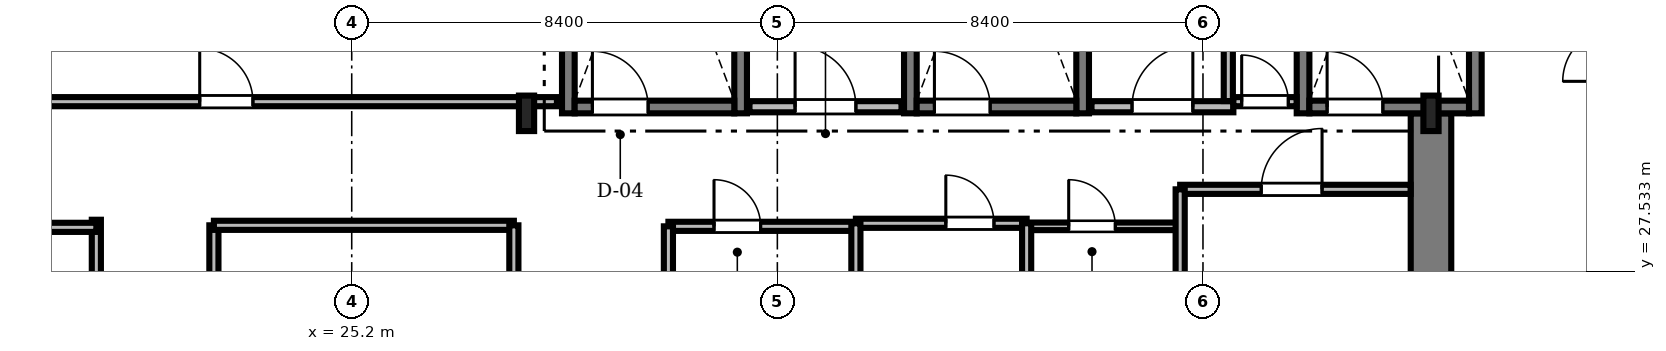
"""IFC4 building model, lengths in metres.
Left out: names, types, materials, properties, quantities, classifications, styles, units other than length and angle.
Written with IfcOpenShell. Run it as: python <this file> out.ifc"""

import sys

from ifc_helpers import new_model, si_unit, direction, frame, frame_2d, origin, origin_2d, place, context, subcontext, project, spatial, rectangle, i_section, extrude, source, transform, mapped, element, fill, save


model = new_model("IFC4")
c1 = context("Model", 3, precision=1e-05, world=origin(), true_north=direction((0.0, 1.0)))
c2 = subcontext(c1, "Body", "Model", "MODEL_VIEW")
j1 = project(units=[si_unit("LENGTHUNIT", "METRE"), si_unit("PLANEANGLEUNIT", "RADIAN")], contexts=[c1])
p1 = place(None, origin())
s1 = spatial("IfcSite", under=j1, at=p1, CompositionType="ELEMENT")
p2 = place(p1, origin())
s2 = spatial("IfcBuilding", under=s1, at=p2, CompositionType="ELEMENT")
p3 = place(p2, frame((0.0, 0.0, 184.8)))
s3 = spatial("IfcBuildingStorey", under=s2, at=p3, CompositionType="ELEMENT", Elevation=184.8)
m1 = source(origin(), c2, "Body", "SweptSolid", [
    extrude(rectangle(XDim=13.15, YDim=0.8, at=frame_2d((6.575, 0.0))), origin(), (0.0, 0.0, 1.0), 3.53),
])
p4 = place(p3, frame((46.5, 17.5, 0.0), z_axis=(0.0, 0.0, 1.0), x_axis=(0.0, 1.0, 0.0)))
e1 = element("IfcWall", 1, at=p4, inside=s3, PredefinedType="SHEAR", context=c2, shape_type="MappedRepresentation", body=[
    mapped(m1, transform((0.0, 0.0, 0.0), scale=1.0)),
])
m2 = source(origin(), c2, "Body", "SweptSolid", [
    extrude(i_section(OverallWidth=0.3, OverallDepth=0.7, WebThickness=0.017, FlangeThickness=0.032, FilletRadius=0.027, at=origin_2d()), origin(), (0.0, 0.0, 1.0), 3.53),
])
for number, where, z_axis, x_axis in (
    (2, (28.65, 30.65, 0.0), (0.0, 0.0, 1.0), (1.0, 0.0, 0.0)),
    (3, (46.5, 30.65, 0.0), (0.0, 0.0, 1.0), (1.0, 0.0, 0.0)),
):
    element("IfcColumn", number, at=place(p3, frame(where, z_axis=z_axis, x_axis=x_axis)), inside=s3, PredefinedType="COLUMN", context=c2, shape_type="MappedRepresentation", body=[
        mapped(m2, transform((0.0, 0.0, 0.0), scale=1.0)),
    ])
m3 = source(origin(), c2, "Body", "SweptSolid", [
    extrude(rectangle(XDim=9.25, YDim=0.25, at=frame_2d((4.625, 0.0))), origin(), (0.0, 0.0, 1.0), 3.55),
])
for number, where, z_axis, x_axis in (
    (4, (29.475, 30.65, 0.0), (0.0, 0.0, 1.0), (0.0, 1.0, 0.0)),
    (5, (32.875, 30.65, 0.0), (0.0, 0.0, 1.0), (0.0, 1.0, 0.0)),
):
    element("IfcWall", number, at=place(p3, frame(where, z_axis=z_axis, x_axis=x_axis)), inside=s3, PredefinedType="SOLIDWALL", context=c2, shape_type="MappedRepresentation", body=[
        mapped(m3, transform((0.0, 0.0, 0.0), scale=1.0)),
    ])
m4 = source(origin(), c2, "Body", "SweptSolid", [
    extrude(rectangle(XDim=3.15, YDim=0.25, at=frame_2d((1.575, 0.0))), origin(), (0.0, 0.0, 1.0), 3.55),
])
p5 = place(p3, frame((29.6, 30.775, 0.0), z_axis=(0.0, 0.0, 1.0), x_axis=(1.0, 0.0, 0.0)))
e6 = element("IfcWall", 6, at=p5, inside=s3, PredefinedType="SOLIDWALL", context=c2, shape_type="MappedRepresentation", body=[
    mapped(m4, transform((0.0, 0.0, 0.0), scale=1.0)),
])
m5 = source(origin(), c2, "Body", "SweptSolid", [
    extrude(rectangle(XDim=1.1, YDim=2.2, at=frame_2d((0.55, 1.1))), frame((0.0, 0.135, 0.0), z_axis=(0.0, -1.0, 0.0), x_axis=(1.0, 0.0, 0.0)), (0.0, 0.0, 1.0), 0.27),
])
p6 = place(p5, frame((0.35, 0.0, 0.0)))
e7 = element("IfcOpeningElement", 7, at=p6, cuts=e6, PredefinedType="OPENING", context=c2, shape_type="MappedRepresentation", body=[
    mapped(m5, transform((0.0, 0.0, 0.0), scale=1.0)),
])
for number, where, z_axis, x_axis in (
    (8, (36.225, 30.65, 0.0), (0.0, 0.0, 1.0), (0.0, 1.0, 0.0)),
    (9, (39.625, 30.65, 0.0), (0.0, 0.0, 1.0), (0.0, 1.0, 0.0)),
):
    element("IfcWall", number, at=place(p3, frame(where, z_axis=z_axis, x_axis=x_axis)), inside=s3, PredefinedType="SOLIDWALL", context=c2, shape_type="MappedRepresentation", body=[
        mapped(m3, transform((0.0, 0.0, 0.0), scale=1.0)),
    ])
p7 = place(p3, frame((36.35, 30.775, 0.0), z_axis=(0.0, 0.0, 1.0), x_axis=(1.0, 0.0, 0.0)))
e10 = element("IfcWall", 10, at=p7, inside=s3, PredefinedType="SOLIDWALL", context=c2, shape_type="MappedRepresentation", body=[
    mapped(m4, transform((0.0, 0.0, 0.0), scale=1.0)),
])
p8 = place(p7, frame((0.35, 0.0, 0.0)))
e11 = element("IfcOpeningElement", 11, at=p8, cuts=e10, PredefinedType="OPENING", context=c2, shape_type="MappedRepresentation", body=[
    mapped(m5, transform((0.0, 0.0, 0.0), scale=1.0)),
])
for number, where, z_axis, x_axis in (
    (12, (43.975, 30.65, 0.0), (0.0, 0.0, 1.0), (0.0, 1.0, 0.0)),
    (13, (47.375, 30.65, 0.0), (0.0, 0.0, 1.0), (0.0, 1.0, 0.0)),
):
    element("IfcWall", number, at=place(p3, frame(where, z_axis=z_axis, x_axis=x_axis)), inside=s3, PredefinedType="SOLIDWALL", context=c2, shape_type="MappedRepresentation", body=[
        mapped(m3, transform((0.0, 0.0, 0.0), scale=1.0)),
    ])
p9 = place(p3, frame((44.1, 30.775, 0.0), z_axis=(0.0, 0.0, 1.0), x_axis=(1.0, 0.0, 0.0)))
e14 = element("IfcWall", 14, at=p9, inside=s3, PredefinedType="SOLIDWALL", context=c2, shape_type="MappedRepresentation", body=[
    mapped(m4, transform((0.0, 0.0, 0.0), scale=1.0)),
])
p10 = place(p9, frame((0.35, 0.0, 0.0)))
e15 = element("IfcOpeningElement", 15, at=p10, cuts=e14, PredefinedType="OPENING", context=c2, shape_type="MappedRepresentation", body=[
    mapped(m5, transform((0.0, 0.0, 0.0), scale=1.0)),
])
m6 = source(origin(), c2, "Body", "SweptSolid", [
    extrude(rectangle(XDim=3.0, YDim=0.22, at=frame_2d((1.5, 0.0))), origin(), (0.0, 0.0, 1.0), 3.53),
])
p11 = place(p3, frame((33.05, 30.78, 0.0), z_axis=(0.0, 0.0, 1.0), x_axis=(1.0, 0.0, 0.0)))
e16 = element("IfcWall", 16, at=p11, inside=s3, PredefinedType="SOLIDWALL", context=c2, shape_type="MappedRepresentation", body=[
    mapped(m6, transform((0.0, 0.0, 0.0), scale=1.0)),
])
m7 = source(origin(), c2, "Body", "SweptSolid", [
    extrude(rectangle(XDim=1.2, YDim=2.2, at=frame_2d((0.6, 1.1))), frame((0.0, 0.12, 0.0), z_axis=(0.0, -1.0, 0.0), x_axis=(1.0, 0.0, 0.0)), (0.0, 0.0, 1.0), 0.24),
])
p12 = place(p11, frame((0.9, 0.0, 0.0)))
e17 = element("IfcOpeningElement", 17, at=p12, cuts=e16, PredefinedType="OPENING", context=c2, shape_type="MappedRepresentation", body=[
    mapped(m7, transform((0.0, 0.0, 0.0), scale=1.0)),
])
m8 = source(origin(), c2, "Body", "SweptSolid", [
    extrude(rectangle(XDim=2.8, YDim=0.22, at=frame_2d((1.4, 0.0))), origin(), (0.0, 0.0, 1.0), 3.53),
])
p13 = place(p3, frame((39.8, 30.78, 0.0), z_axis=(0.0, 0.0, 1.0), x_axis=(1.0, 0.0, 0.0)))
e18 = element("IfcWall", 18, at=p13, inside=s3, PredefinedType="SOLIDWALL", context=c2, shape_type="MappedRepresentation", body=[
    mapped(m8, transform((0.0, 0.0, 0.0), scale=1.0)),
])
p14 = place(p13, frame((0.8, 0.0, 0.0)))
e19 = element("IfcOpeningElement", 19, at=p14, cuts=e18, PredefinedType="OPENING", context=c2, shape_type="MappedRepresentation", body=[
    mapped(m7, transform((0.0, 0.0, 0.0), scale=1.0)),
])
m9 = source(origin(), c2, "Body", "SweptSolid", [
    extrude(rectangle(XDim=17.828, YDim=0.18, at=frame_2d((8.914, 0.0))), origin(), (0.0, 0.0, 1.0), 2.772),
])
p15 = place(p3, frame((11.422, 30.88, 0.0), z_axis=(0.0, 0.0, 1.0), x_axis=(1.0, 0.0, 0.0)))
e20 = element("IfcWall", 20, at=p15, inside=s3, PredefinedType="PARTITIONING", context=c2, shape_type="MappedRepresentation", body=[
    mapped(m9, transform((0.0, 0.0, 0.0), scale=1.0)),
])
m10 = source(origin(), c2, "Body", "SweptSolid", [
    extrude(rectangle(XDim=1.05, YDim=2.2, at=frame_2d((0.525, 1.1))), frame((0.0, 0.1, 0.0), z_axis=(0.0, -1.0, 0.0), x_axis=(1.0, 0.0, 0.0)), (0.0, 0.0, 1.0), 0.2),
])
p16 = place(p15, frame((10.778, 0.0, 0.0)))
e21 = element("IfcOpeningElement", 21, at=p16, cuts=e20, PredefinedType="OPENING", context=c2, shape_type="MappedRepresentation", body=[
    mapped(m10, transform((0.0, 0.0, 0.0), scale=1.0)),
])
m11 = source(origin(), c2, "Body", "SweptSolid", [
    extrude(rectangle(XDim=15.04, YDim=0.18, at=frame_2d((7.52, 0.0))), origin(), (0.0, 0.0, 1.0), 2.972),
])
p17 = place(p3, frame((20.16, 13.51, 0.0), z_axis=(0.0, 0.0, 1.0), x_axis=(0.0, 1.0, 0.0)))
e22 = element("IfcWall", 22, at=p17, inside=s3, PredefinedType="PARTITIONING", context=c2, shape_type="MappedRepresentation", body=[
    mapped(m11, transform((0.0, 0.0, 0.0), scale=1.0)),
])
p18 = place(p17, frame((3.202, 0.0, 0.0)))
e23 = element("IfcOpeningElement", 23, at=p18, cuts=e22, PredefinedType="OPENING", context=c2, shape_type="MappedRepresentation", body=[
    mapped(m10, transform((0.0, 0.0, 0.0), scale=1.0)),
])
m12 = source(origin(), c2, "Body", "SweptSolid", [
    extrude(rectangle(XDim=0.95, YDim=2.15, at=frame_2d((0.475, 1.075))), frame((0.0, 0.1, 0.0), z_axis=(0.0, -1.0, 0.0), x_axis=(1.0, 0.0, 0.0)), (0.0, 0.0, 1.0), 0.2),
])
p19 = place(p17, frame((11.873, 0.0, 0.0)))
e24 = element("IfcOpeningElement", 24, at=p19, cuts=e22, PredefinedType="OPENING", context=c2, shape_type="MappedRepresentation", body=[
    mapped(m12, transform((0.0, 0.0, 0.0), scale=1.0)),
])
m13 = source(origin(), c2, "Body", "SweptSolid", [
    extrude(rectangle(XDim=4.548, YDim=0.18, at=frame_2d((2.274, 0.0))), origin(), (0.0, 0.0, 1.0), 3.162),
])
p20 = place(p3, frame((41.55, 29.15, 0.0), z_axis=(0.0, 0.0, 1.0), x_axis=(1.0, 0.0, 0.0)))
e25 = element("IfcWall", 25, at=p20, inside=s3, PredefinedType="PARTITIONING", context=c2, shape_type="MappedRepresentation", body=[
    mapped(m13, transform((0.0, 0.0, 0.0), scale=1.0)),
])
m14 = source(origin(), c2, "Body", "SweptSolid", [
    extrude(rectangle(XDim=1.2, YDim=2.2, at=frame_2d((0.6, 1.1))), frame((0.0, 0.1, 0.0), z_axis=(0.0, -1.0, 0.0), x_axis=(1.0, 0.0, 0.0)), (0.0, 0.0, 1.0), 0.2),
])
p21 = place(p20, frame((1.6, 0.0, 0.0)))
e26 = element("IfcOpeningElement", 26, at=p21, cuts=e25, PredefinedType="OPENING", context=c2, shape_type="MappedRepresentation", body=[
    mapped(m14, transform((0.0, 0.0, 0.0), scale=1.0)),
])
m15 = source(origin(), c2, "Body", "SweptSolid", [
    extrude(rectangle(XDim=4.24, YDim=0.18, at=frame_2d((2.12, 0.0))), origin(), (0.0, 0.0, 1.0), 2.972),
])
p22 = place(p3, frame((22.48, 24.2, 0.0), z_axis=(0.0, 0.0, 1.0), x_axis=(0.0, 1.0, 0.0)))
e27 = element("IfcWall", 27, at=p22, inside=s3, PredefinedType="PARTITIONING", context=c2, shape_type="MappedRepresentation", body=[
    mapped(m15, transform((0.0, 0.0, 0.0), scale=1.0)),
])
p23 = place(p22, frame((1.4, 0.0, 0.0)))
e28 = element("IfcOpeningElement", 28, at=p23, cuts=e27, PredefinedType="OPENING", context=c2, shape_type="MappedRepresentation", body=[
    mapped(m10, transform((0.0, 0.0, 0.0), scale=1.0)),
])
m16 = source(origin(), c2, "Body", "SweptSolid", [
    extrude(rectangle(XDim=3.7, YDim=0.18, at=frame_2d((1.85, 0.0))), origin(), (0.0, 0.0, 1.0), 3.162),
])
p24 = place(p3, frame((31.45, 28.42, 0.0), z_axis=(0.0, 0.0, 1.0), x_axis=(1.0, 0.0, 0.0)))
e29 = element("IfcWall", 29, at=p24, inside=s3, PredefinedType="PARTITIONING", context=c2, shape_type="MappedRepresentation", body=[
    mapped(m16, transform((0.0, 0.0, 0.0), scale=1.0)),
])
m17 = source(origin(), c2, "Body", "SweptSolid", [
    extrude(rectangle(XDim=0.92, YDim=2.1, at=frame_2d((0.46, 1.05))), frame((0.0, 0.1, 0.0), z_axis=(0.0, -1.0, 0.0), x_axis=(1.0, 0.0, 0.0)), (0.0, 0.0, 1.0), 0.2),
])
p25 = place(p24, frame((0.9, 0.0, 0.0)))
e30 = element("IfcOpeningElement", 30, at=p25, cuts=e29, PredefinedType="OPENING", context=c2, shape_type="MappedRepresentation", body=[
    mapped(m17, transform((0.0, 0.0, 0.0), scale=1.0)),
])
m18 = source(origin(), c2, "Body", "SweptSolid", [
    extrude(rectangle(XDim=3.37, YDim=0.18, at=frame_2d((1.685, 0.0))), origin(), (0.0, 0.0, 1.0), 3.53),
])
p26 = place(p3, frame((35.15, 28.48, 0.0), z_axis=(0.0, 0.0, 1.0), x_axis=(1.0, 0.0, 0.0)))
e31 = element("IfcWall", 31, at=p26, inside=s3, PredefinedType="PARTITIONING", context=c2, shape_type="MappedRepresentation", body=[
    mapped(m18, transform((0.0, 0.0, 0.0), scale=1.0)),
])
p27 = place(p26, frame((1.775, 0.0, 0.0)))
e32 = element("IfcOpeningElement", 32, at=p27, cuts=e31, PredefinedType="OPENING", context=c2, shape_type="MappedRepresentation", body=[
    mapped(m12, transform((0.0, 0.0, 0.0), scale=1.0)),
])
m19 = source(origin(), c2, "Body", "SweptSolid", [
    extrude(rectangle(XDim=3.0, YDim=0.15, at=frame_2d((1.5, 0.0))), origin(), (0.0, 0.0, 1.0), 3.53),
])
p28 = place(p3, frame((38.52, 28.42, 0.0), z_axis=(0.0, 0.0, 1.0), x_axis=(1.0, 0.0, 0.0)))
e33 = element("IfcWall", 33, at=p28, inside=s3, PredefinedType="PARTITIONING", context=c2, shape_type="MappedRepresentation", body=[
    mapped(m19, transform((0.0, 0.0, 0.0), scale=1.0)),
])
m20 = source(origin(), c2, "Body", "SweptSolid", [
    extrude(rectangle(XDim=0.92, YDim=2.1, at=frame_2d((0.46, 1.05))), frame((0.0, 0.085, 0.0), z_axis=(0.0, -1.0, 0.0), x_axis=(1.0, 0.0, 0.0)), (0.0, 0.0, 1.0), 0.17),
])
p29 = place(p28, frame((0.83, 0.0, 0.0)))
e34 = element("IfcOpeningElement", 34, at=p29, cuts=e33, PredefinedType="OPENING", context=c2, shape_type="MappedRepresentation", body=[
    mapped(m20, transform((0.0, 0.0, 0.0), scale=1.0)),
])
m21 = source(origin(), c2, "Body", "SweptSolid", [
    extrude(rectangle(XDim=1.248, YDim=0.18, at=frame_2d((0.624, 0.0))), origin(), (0.0, 0.0, 1.0), 3.53),
])
p30 = place(p3, frame((42.6, 30.88, 0.0), z_axis=(0.0, 0.0, 1.0), x_axis=(1.0, 0.0, 0.0)))
e35 = element("IfcWall", 35, at=p30, inside=s3, PredefinedType="PARTITIONING", context=c2, shape_type="MappedRepresentation", body=[
    mapped(m21, transform((0.0, 0.0, 0.0), scale=1.0)),
])
p31 = place(p30, frame((0.164, 0.0, 0.0)))
e36 = element("IfcOpeningElement", 36, at=p31, cuts=e35, PredefinedType="OPENING", context=c2, shape_type="MappedRepresentation", body=[
    mapped(m17, transform((0.0, 0.0, 0.0), scale=1.0)),
])
m22 = source(origin(), c2, "Body", "SweptSolid", [
    extrude(rectangle(XDim=8.93, YDim=0.18, at=frame_2d((4.465, 0.0))), origin(), (0.0, 0.0, 1.0), 2.772),
])
p32 = place(p3, frame((11.23, 28.4, 0.0), z_axis=(0.0, 0.0, 1.0), x_axis=(1.0, 0.0, 0.0)))
e37 = element("IfcWall", 37, at=p32, inside=s3, PredefinedType="PARTITIONING", context=c2, shape_type="MappedRepresentation", body=[
    mapped(m22, transform((0.0, 0.0, 0.0), scale=1.0)),
])
m23 = source(origin(), c2, "Body", "SweptSolid", [
    extrude(rectangle(XDim=5.92, YDim=0.18, at=frame_2d((2.96, 0.0))), origin(), (0.0, 0.0, 1.0), 3.53),
])
p33 = place(p3, frame((22.48, 28.44, 0.0), z_axis=(0.0, 0.0, 1.0), x_axis=(1.0, 0.0, 0.0)))
e38 = element("IfcWall", 38, at=p33, inside=s3, PredefinedType="PARTITIONING", context=c2, shape_type="MappedRepresentation", body=[
    mapped(m23, transform((0.0, 0.0, 0.0), scale=1.0)),
])
p34 = place(p3, frame((28.4, 24.2, 0.0), z_axis=(0.0, 0.0, 1.0), x_axis=(0.0, 1.0, 0.0)))
e39 = element("IfcWall", 39, at=p34, inside=s3, PredefinedType="PARTITIONING", context=c2, shape_type="MappedRepresentation", body=[
    mapped(m15, transform((0.0, 0.0, 0.0), scale=1.0)),
])
m24 = source(origin(), c2, "Body", "SweptSolid", [
    extrude(rectangle(XDim=2.35, YDim=0.18, at=frame_2d((1.175, 0.0))), origin(), (0.0, 0.0, 1.0), 2.972),
])
p35 = place(p3, frame((41.55, 26.8, 0.0), z_axis=(0.0, 0.0, 1.0), x_axis=(0.0, 1.0, 0.0)))
e40 = element("IfcWall", 40, at=p35, inside=s3, PredefinedType="PARTITIONING", context=c2, shape_type="MappedRepresentation", body=[
    mapped(m24, transform((0.0, 0.0, 0.0), scale=1.0)),
])
m25 = source(origin(), c2, "Body", "SweptSolid", [
    extrude(rectangle(XDim=1.858, YDim=0.18, at=frame_2d((0.929, 0.0))), origin(), (0.0, 0.0, 1.0), 3.53),
])
p36 = place(p3, frame((42.5, 30.892, 0.0), z_axis=(0.0, 0.0, 1.0), x_axis=(0.0, 1.0, 0.0)))
e41 = element("IfcWall", 41, at=p36, inside=s3, PredefinedType="PARTITIONING", context=c2, shape_type="MappedRepresentation", body=[
    mapped(m25, transform((0.0, 0.0, 0.0), scale=1.0)),
])
m26 = source(origin(), c2, "Body", "SweptSolid", [
    extrude(rectangle(XDim=1.66, YDim=0.18, at=frame_2d((0.83, 0.0))), origin(), (0.0, 0.0, 1.0), 3.072),
])
for number, where, z_axis, x_axis in (
    (42, (35.15, 26.82, 0.0), (0.0, 0.0, 1.0), (0.0, 1.0, 0.0)),
    (43, (38.52, 26.82, 0.0), (0.0, 0.0, 1.0), (0.0, 1.0, 0.0)),
):
    element("IfcWall", number, at=place(p3, frame(where, z_axis=z_axis, x_axis=x_axis)), inside=s3, PredefinedType="PARTITIONING", context=c2, shape_type="MappedRepresentation", body=[
        mapped(m26, transform((0.0, 0.0, 0.0), scale=1.0)),
    ])
m27 = source(origin(), c2, "Body", "SweptSolid", [
    extrude(rectangle(XDim=1.6, YDim=0.18, at=frame_2d((0.8, 0.0))), origin(), (0.0, 0.0, 1.0), 3.072),
])
p37 = place(p3, frame((31.45, 26.82, 0.0), z_axis=(0.0, 0.0, 1.0), x_axis=(0.0, 1.0, 0.0)))
e44 = element("IfcWall", 44, at=p37, inside=s3, PredefinedType="PARTITIONING", context=c2, shape_type="MappedRepresentation", body=[
    mapped(m27, transform((0.0, 0.0, 0.0), scale=1.0)),
])
m28 = source(origin(), c2, "Body", "SweptSolid", [
    extrude(rectangle(XDim=1.1, YDim=2.2, at=frame_2d((0.55, 1.1))), frame((0.0, 0.025, 0.0), z_axis=(0.0, -1.0, 0.0), x_axis=(1.0, 0.0, 0.0)), (0.0, 0.0, 1.0), 0.05),
])
p38 = place(p6, origin())
e45 = element("IfcDoor", 45, at=p38, inside=s3, OperationType="SINGLE_SWING_LEFT", PredefinedType="DOOR", context=c2, shape_type="MappedRepresentation", body=[
    mapped(m28, transform((0.0, 0.0, 0.0), scale=1.0)),
])
fill(e7, e45)
p39 = place(p8, origin())
e46 = element("IfcDoor", 46, at=p39, inside=s3, OperationType="SINGLE_SWING_LEFT", PredefinedType="DOOR", context=c2, shape_type="MappedRepresentation", body=[
    mapped(m28, transform((0.0, 0.0, 0.0), scale=1.0)),
])
fill(e11, e46)
p40 = place(p10, origin())
e47 = element("IfcDoor", 47, at=p40, inside=s3, OperationType="SINGLE_SWING_LEFT", PredefinedType="DOOR", context=c2, shape_type="MappedRepresentation", body=[
    mapped(m28, transform((0.0, 0.0, 0.0), scale=1.0)),
])
fill(e15, e47)
m29 = source(origin(), c2, "Body", "SweptSolid", [
    extrude(rectangle(XDim=1.2, YDim=2.2, at=frame_2d((0.6, 1.1))), frame((0.0, 0.025, 0.0), z_axis=(0.0, -1.0, 0.0), x_axis=(1.0, 0.0, 0.0)), (0.0, 0.0, 1.0), 0.05),
])
p41 = place(p12, origin())
e48 = element("IfcDoor", 48, at=p41, inside=s3, OperationType="SINGLE_SWING_LEFT", PredefinedType="DOOR", context=c2, shape_type="MappedRepresentation", body=[
    mapped(m29, transform((0.0, 0.0, 0.0), scale=1.0)),
])
fill(e17, e48)
p42 = place(p14, origin())
e49 = element("IfcDoor", 49, at=p42, inside=s3, OperationType="SINGLE_SWING_RIGHT", PredefinedType="DOOR", context=c2, shape_type="MappedRepresentation", body=[
    mapped(m29, transform((0.0, 0.0, 0.0), scale=1.0)),
])
fill(e19, e49)
m30 = source(origin(), c2, "Body", "SweptSolid", [
    extrude(rectangle(XDim=1.05, YDim=2.2, at=frame_2d((0.525, 1.1))), frame((0.0, 0.025, 0.0), z_axis=(0.0, -1.0, 0.0), x_axis=(1.0, 0.0, 0.0)), (0.0, 0.0, 1.0), 0.05),
])
p43 = place(p16, origin())
e50 = element("IfcDoor", 50, at=p43, inside=s3, OperationType="SINGLE_SWING_LEFT", PredefinedType="DOOR", context=c2, shape_type="MappedRepresentation", body=[
    mapped(m30, transform((0.0, 0.0, 0.0), scale=1.0)),
])
fill(e21, e50)
p44 = place(p21, origin())
e51 = element("IfcDoor", 51, at=p44, inside=s3, OperationType="SINGLE_SWING_RIGHT", PredefinedType="DOOR", context=c2, shape_type="MappedRepresentation", body=[
    mapped(m29, transform((0.0, 0.0, 0.0), scale=1.0)),
])
fill(e26, e51)
m31 = source(origin(), c2, "Body", "SweptSolid", [
    extrude(rectangle(XDim=0.92, YDim=2.1, at=frame_2d((0.46, 1.05))), frame((0.0, 0.025, 0.0), z_axis=(0.0, -1.0, 0.0), x_axis=(1.0, 0.0, 0.0)), (0.0, 0.0, 1.0), 0.05),
])
p45 = place(p25, origin())
e52 = element("IfcDoor", 52, at=p45, inside=s3, OperationType="SINGLE_SWING_LEFT", PredefinedType="DOOR", context=c2, shape_type="MappedRepresentation", body=[
    mapped(m31, transform((0.0, 0.0, 0.0), scale=1.0)),
])
fill(e30, e52)
m32 = source(origin(), c2, "Body", "SweptSolid", [
    extrude(rectangle(XDim=0.95, YDim=2.15, at=frame_2d((0.475, 1.075))), frame((0.0, 0.025, 0.0), z_axis=(0.0, -1.0, 0.0), x_axis=(1.0, 0.0, 0.0)), (0.0, 0.0, 1.0), 0.05),
])
p46 = place(p27, origin())
e53 = element("IfcDoor", 53, at=p46, inside=s3, OperationType="SINGLE_SWING_LEFT", PredefinedType="DOOR", context=c2, shape_type="MappedRepresentation", body=[
    mapped(m32, transform((0.0, 0.0, 0.0), scale=1.0)),
])
fill(e32, e53)
p47 = place(p29, origin())
e54 = element("IfcDoor", 54, at=p47, inside=s3, OperationType="SINGLE_SWING_LEFT", PredefinedType="DOOR", context=c2, shape_type="MappedRepresentation", body=[
    mapped(m31, transform((0.0, 0.0, 0.0), scale=1.0)),
])
fill(e34, e54)
p48 = place(p31, origin())
e55 = element("IfcDoor", 55, at=p48, inside=s3, OperationType="SINGLE_SWING_LEFT", PredefinedType="DOOR", context=c2, shape_type="MappedRepresentation", body=[
    mapped(m31, transform((0.0, 0.0, 0.0), scale=1.0)),
])
fill(e36, e55)
save(model, sys.argv[1])
